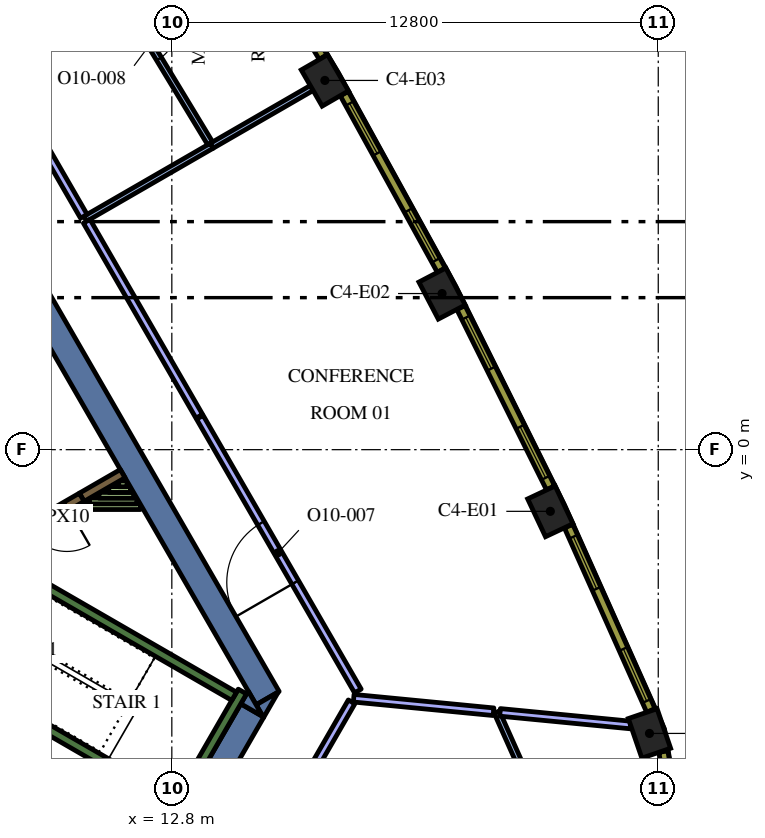
"""IFC4 building model, lengths in metres.
Left out: names, types, materials, properties, quantities, classifications, styles, units other than length and angle.
Written with IfcOpenShell. Run it as: python <this file> out.ifc"""

import sys

from ifc_helpers import new_model, si_unit, direction, frame, frame_2d, origin, origin_2d, place, context, subcontext, project, spatial, polyline, rectangle, outline, extrude, element, fill, save


model = new_model("IFC4")
c1 = context("Model", 3, precision=1e-05, world=origin(), true_north=direction((0.0, 1.0)))
c2 = subcontext(c1, "Body", "Model", "MODEL_VIEW")
j1 = project(units=[si_unit("LENGTHUNIT", "METRE"), si_unit("PLANEANGLEUNIT", "RADIAN")], contexts=[c1])
p1 = place(None, origin())
s1 = spatial("IfcSite", under=j1, at=p1, CompositionType="ELEMENT")
p2 = place(p1, origin())
s2 = spatial("IfcBuilding", under=s1, at=p2, CompositionType="ELEMENT")
p3 = place(p2, frame((0.0, 0.0, 252.0)))
s3 = spatial("IfcBuildingStorey", under=s2, at=p3, CompositionType="ELEMENT", Elevation=252.0)
for number, where, z_axis, x_axis in (
    (1, (25.369, -7.466, 0.0), (0.0, 0.0, 1.0), (-0.324, 0.946, 0.0)),
    (2, (22.76, -1.623, 0.0), (0.0, 0.0, 1.0), (-0.426, 0.905, 0.0)),
    (3, (19.912, 4.108, 0.0), (0.0, 0.0, 1.0), (-0.464, 0.886, 0.0)),
    (4, (16.827, 9.715, 0.0), (0.0, 0.0, 1.0), (-0.5, 0.866, 0.0)),
):
    element("IfcColumn", number, at=place(p3, frame(where, z_axis=z_axis, x_axis=x_axis)), inside=s3, PredefinedType="COLUMN", context=c2, shape_type="SweptSolid", body=[
        extrude(rectangle(XDim=1.1, YDim=0.8, at=origin_2d()), origin(), (0.0, 0.0, 1.0), 4.2),
    ])
p4 = place(p3, frame((9.085, 4.264, 0.0), z_axis=(0.0, 0.0, 1.0), x_axis=(0.499998082512, -0.866026510844, 0.0)))
e5 = element("IfcWall", 5, at=p4, inside=s3, PredefinedType="SOLIDWALL", context=c2, shape_type="SweptSolid", body=[
    extrude(rectangle(XDim=12.472, YDim=0.7, at=frame_2d((6.236, 0.0))), origin(), (0.0, 0.0, 1.0), 4.2),
])
p5 = place(p3, origin())
e6 = element("IfcWall", 6, at=p5, inside=s3, PredefinedType="SOLIDWALL", context=c2, shape_type="SweptSolid", body=[
    extrude(outline(polyline([(15.213, -7.05), (15.019, -6.714), (15.601, -6.378), (15.213, -7.05)])), origin(), (0.0, 0.0, 1.0), 4.2),
])
p6 = place(p3, frame((13.003, -10.179, 0.0), z_axis=(0.0, 0.0, 1.0), x_axis=(0.499972675833, 0.866041178825, 0.0)))
e7 = element("IfcWall", 7, at=p6, inside=s3, PredefinedType="SOLIDWALL", context=c2, shape_type="SweptSolid", body=[
    extrude(rectangle(XDim=3.829, YDim=0.7, at=frame_2d((1.915, 0.0))), origin(), (0.0, 0.0, 1.0), 4.2),
])
e8 = element("IfcWall", 8, at=p5, inside=s3, PredefinedType="SOLIDWALL", context=c2, shape_type="SweptSolid", body=[
    extrude(outline(polyline([(14.809, -6.35), (15.197, -7.022), (14.615, -6.686), (14.809, -6.35)])), origin(), (0.0, 0.0, 1.0), 4.2),
])
p7 = place(p3, frame((12.84, -9.511, 0.0), z_axis=(0.0, 0.0, 1.0), x_axis=(0.500048121057, 0.865997619297, 0.0)))
e9 = element("IfcWall", 9, at=p7, inside=s3, PredefinedType="SOLIDWALL", context=c2, shape_type="SweptSolid", body=[
    extrude(rectangle(XDim=3.634, YDim=0.25, at=frame_2d((1.817, 0.0))), origin(), (0.0, 0.0, 1.0), 4.2),
])
p8 = place(p3, frame((12.84, -9.261, 0.0), z_axis=(0.0, 0.0, 1.0), x_axis=(-0.866013990052, 0.500019768644, 0.0)))
e10 = element("IfcWall", 10, at=p8, inside=s3, PredefinedType="SOLIDWALL", context=c2, shape_type="SweptSolid", body=[
    extrude(rectangle(XDim=6.8, YDim=0.25, at=frame_2d((3.4, 0.0))), origin(), (0.0, 0.0, 1.0), 4.2),
])
p9 = place(p3, frame((8.334, -2.964, 0.0), z_axis=(0.0, 0.0, 1.0), x_axis=(0.866016039709, -0.500016218704, 0.0)))
e11 = element("IfcWall", 11, at=p9, inside=s3, PredefinedType="SOLIDWALL", context=c2, shape_type="SweptSolid", body=[
    extrude(rectangle(XDim=7.05, YDim=0.25, at=frame_2d((3.525, 0.0))), origin(), (0.0, 0.0, 1.0), 4.2),
])
p10 = place(p3, frame((11.507, -0.631, 0.0), z_axis=(0.0, 0.0, 1.0), x_axis=(-0.866025525965, -0.499999788377, 0.0)))
e12 = element("IfcWall", 12, at=p10, inside=s3, PredefinedType="SOLIDWALL", context=c2, shape_type="SweptSolid", body=[
    extrude(rectangle(XDim=1.245, YDim=0.25, at=frame_2d((0.622, 0.0))), origin(), (0.0, 0.0, 1.0), 4.2),
])
p11 = place(p3, frame((10.362, -1.5, 0.0), z_axis=(0.0, 0.0, 1.0), x_axis=(1.0, 0.0, 0.0)))
e13 = element("IfcWall", 13, at=p11, inside=s3, PredefinedType="PARTITIONING", context=c2, shape_type="SweptSolid", body=[
    extrude(rectangle(XDim=1.61, YDim=0.15, at=frame_2d((0.805, 0.0))), origin(), (0.0, 0.0, 1.0), 3.4),
])
p12 = place(p3, frame((10.622, -1.35, 0.0), z_axis=(0.0, 0.0, 1.0), x_axis=(1.0, 0.0, 0.0)))
e14 = element("IfcWall", 14, at=p12, inside=s3, PredefinedType="PARTITIONING", context=c2, shape_type="SweptSolid", body=[
    extrude(rectangle(XDim=1.263, YDim=0.15, at=frame_2d((0.632, 0.0))), origin(), (0.0, 0.0, 1.0), 3.4),
])
p13 = place(p3, frame((10.882, -1.2, 0.0), z_axis=(0.0, 0.0, 1.0), x_axis=(1.0, 0.0, 0.0)))
e15 = element("IfcWall", 15, at=p13, inside=s3, PredefinedType="PARTITIONING", context=c2, shape_type="SweptSolid", body=[
    extrude(rectangle(XDim=0.917, YDim=0.15, at=frame_2d((0.459, 0.0))), origin(), (0.0, 0.0, 1.0), 3.4),
])
p14 = place(p3, frame((11.712, -1.05, 0.0), z_axis=(0.0, 0.0, 1.0), x_axis=(-1.0, 0.0, 0.0)))
e16 = element("IfcWall", 16, at=p14, inside=s3, PredefinedType="PARTITIONING", context=c2, shape_type="SweptSolid", body=[
    extrude(rectangle(XDim=0.571, YDim=0.15, at=frame_2d((0.285, 0.0))), origin(), (0.0, 0.0, 1.0), 3.4),
])
p15 = place(p3, frame((11.401, -0.9, 0.0), z_axis=(0.0, 0.0, 1.0), x_axis=(1.0, 0.0, 0.0)))
e17 = element("IfcWall", 17, at=p15, inside=s3, PredefinedType="PARTITIONING", context=c2, shape_type="SweptSolid", body=[
    extrude(rectangle(XDim=0.224, YDim=0.15, at=frame_2d((0.112, 0.0))), origin(), (0.0, 0.0, 1.0), 3.4),
])
p16 = place(p3, frame((10.429, -1.253, 0.0), z_axis=(0.0, 0.0, 1.0), x_axis=(-0.866009402589, -0.500027713859, 0.0)))
e18 = element("IfcWall", 18, at=p16, inside=s3, PredefinedType="SOLIDWALL", context=c2, shape_type="SweptSolid", body=[
    extrude(rectangle(XDim=2.1, YDim=0.25, at=frame_2d((1.05, 0.0))), origin(), (0.0, 0.0, 1.0), 4.2),
])
p17 = place(p16, frame((0.45, 0.0, 0.0)))
e19 = element("IfcOpeningElement", 19, at=p17, cuts=e18, PredefinedType="OPENING", context=c2, shape_type="SweptSolid", body=[
    extrude(rectangle(XDim=1.2, YDim=2.1, at=frame_2d((0.6, 1.05))), frame((0.0, 0.135, 0.0), z_axis=(0.0, -1.0, 0.0), x_axis=(1.0, 0.0, 0.0)), (0.0, 0.0, 1.0), 0.27),
])
p18 = place(p3, frame((21.963, -8.276, 0.0), z_axis=(0.0, 0.0, 1.0), x_axis=(-0.407570957072, 0.913173540436, 0.0)))
e20 = element("IfcWall", 20, at=p18, inside=s3, PredefinedType="PARTITIONING", context=c2, shape_type="SweptSolid", body=[
    extrude(rectangle(XDim=1.502, YDim=0.15, at=frame_2d((0.751, 0.0))), origin(), (0.0, 0.0, 1.0), 3.4),
])
p19 = place(p3, frame((21.437, -6.913, 0.0), z_axis=(0.0, 0.0, 1.0), x_axis=(0.995357015301, -0.096251816042, 0.0)))
e21 = element("IfcWall", 21, at=p19, inside=s3, PredefinedType="PARTITIONING", context=c2, shape_type="SweptSolid", body=[
    extrude(rectangle(XDim=3.45, YDim=0.2, at=frame_2d((1.725, 0.0))), origin(), (0.0, 0.0, 1.0), 3.4),
])
p20 = place(p3, frame((17.586, -6.54, 0.0), z_axis=(0.0, 0.0, 1.0), x_axis=(0.995358181524, -0.096239755158, 0.0)))
e22 = element("IfcWall", 22, at=p20, inside=s3, PredefinedType="PARTITIONING", context=c2, shape_type="SweptSolid", body=[
    extrude(rectangle(XDim=3.696, YDim=0.2, at=frame_2d((1.848, 0.0))), origin(), (0.0, 0.0, 1.0), 3.4),
])
p21 = place(p3, frame((14.362, -12.124, 0.0), z_axis=(0.0, 0.0, 1.0), x_axis=(0.500017005442, 0.866015585465, 0.0)))
e23 = element("IfcWall", 23, at=p21, inside=s3, PredefinedType="PARTITIONING", context=c2, shape_type="SweptSolid", body=[
    extrude(rectangle(XDim=6.338, YDim=0.2, at=frame_2d((3.169, 0.0))), origin(), (0.0, 0.0, 1.0), 3.4),
])
p22 = place(p3, frame((13.844, 7.993, 0.0), z_axis=(0.0, 0.0, 1.0), x_axis=(0.866003976688, 0.500037110984, 0.0)))
e24 = element("IfcWall", 24, at=p22, inside=s3, PredefinedType="PARTITIONING", context=c2, shape_type="SweptSolid", body=[
    extrude(rectangle(XDim=3.045, YDim=0.15, at=frame_2d((1.522, 0.0))), origin(), (0.0, 0.0, 1.0), 3.4),
])
p23 = place(p3, frame((10.522, 6.075, 0.0), z_axis=(0.0, 0.0, 1.0), x_axis=(0.866002601515, 0.500039492609, 0.0)))
e25 = element("IfcWall", 25, at=p23, inside=s3, PredefinedType="PARTITIONING", context=c2, shape_type="SweptSolid", body=[
    extrude(rectangle(XDim=3.844, YDim=0.15, at=frame_2d((1.922, 0.0))), origin(), (0.0, 0.0, 1.0), 3.4),
])
p24 = place(p3, frame((13.522, 0.879, 0.0), z_axis=(0.0, 0.0, 1.0), x_axis=(-0.499994727438, 0.866028447878, 0.0)))
e26 = element("IfcWall", 26, at=p24, inside=s3, PredefinedType="PARTITIONING", context=c2, shape_type="SweptSolid", body=[
    extrude(rectangle(XDim=5.925, YDim=0.2, at=frame_2d((2.962, 0.0))), origin(), (0.0, 0.0, 1.0), 3.4),
])
p25 = place(p3, frame((17.696, -6.35, 0.0), z_axis=(0.0, 0.0, 1.0), x_axis=(-0.500009576767, 0.866019874565, 0.0)))
e27 = element("IfcWall", 27, at=p25, inside=s3, PredefinedType="PARTITIONING", context=c2, shape_type="SweptSolid", body=[
    extrude(rectangle(XDim=8.317, YDim=0.2, at=frame_2d((4.159, 0.0))), origin(), (0.0, 0.0, 1.0), 3.4),
])
p26 = place(p25, frame((3.3, 0.0, 0.0)))
e28 = element("IfcOpeningElement", 28, at=p26, cuts=e27, PredefinedType="OPENING", context=c2, shape_type="SweptSolid", body=[
    extrude(rectangle(XDim=1.8, YDim=2.1, at=frame_2d((0.9, 1.05))), frame((0.0, 0.11, 0.0), z_axis=(0.0, -1.0, 0.0), x_axis=(1.0, 0.0, 0.0)), (0.0, 0.0, 1.0), 0.22),
])
p27 = place(p3, frame((10.607, 13.347, 0.0), z_axis=(0.0, 0.0, 1.0), x_axis=(0.517871895574, -0.855458181196, 0.0)))
e29 = element("IfcWall", 29, at=p27, inside=s3, PredefinedType="PARTITIONING", context=c2, shape_type="SweptSolid", body=[
    extrude(rectangle(XDim=6.182, YDim=0.15, at=frame_2d((3.091, 0.0))), origin(), (0.0, 0.0, 1.0), 3.4),
])
p28 = place(p27, frame((2.682, 0.0, 0.0)))
e30 = element("IfcOpeningElement", 30, at=p28, cuts=e29, PredefinedType="OPENING", context=c2, shape_type="SweptSolid", body=[
    extrude(rectangle(XDim=0.9, YDim=2.1, at=frame_2d((0.45, 1.05))), frame((0.0, 0.085, 0.0), z_axis=(0.0, -1.0, 0.0), x_axis=(1.0, 0.0, 0.0)), (0.0, 0.0, 1.0), 0.17),
])
p29 = place(p3, frame((10.485, 6.14, 0.0), z_axis=(0.0, 0.0, 1.0), x_axis=(-0.499976885332, 0.866038748633, 0.0)))
e31 = element("IfcWall", 31, at=p29, inside=s3, PredefinedType="PARTITIONING", context=c2, shape_type="SweptSolid", body=[
    extrude(rectangle(XDim=5.925, YDim=0.2, at=frame_2d((2.962, 0.0))), origin(), (0.0, 0.0, 1.0), 3.4),
])
p30 = place(p3, frame((26.172, -10.517, 0.0), z_axis=(0.0, 0.0, 1.0), x_axis=(-0.167660055546, 0.985844869021, 0.0)))
e32 = element("IfcWall", 32, at=p30, inside=s3, PredefinedType="SOLIDWALL", context=c2, shape_type="SweptSolid", body=[
    extrude(rectangle(XDim=2.609, YDim=0.24, at=frame_2d((1.305, 0.0))), origin(), (0.0, 0.0, 1.0), 3.9),
])
p31 = place(p30, frame((0.805, 0.0, 0.9)))
e33 = element("IfcOpeningElement", 33, at=p31, cuts=e32, PredefinedType="OPENING", context=c2, shape_type="SweptSolid", body=[
    extrude(rectangle(XDim=1.0, YDim=2.55, at=frame_2d((0.5, 1.275))), frame((0.0, 0.13, 0.0), z_axis=(0.0, -1.0, 0.0), x_axis=(1.0, 0.0, 0.0)), (0.0, 0.0, 1.0), 0.26),
])
p32 = place(p3, frame((25.405, -6.861, 0.0), z_axis=(0.0, 0.0, 1.0), x_axis=(-0.407579651789, 0.913169659728, 0.0)))
e34 = element("IfcWall", 34, at=p32, inside=s3, PredefinedType="SOLIDWALL", context=c2, shape_type="SweptSolid", body=[
    extrude(rectangle(XDim=5.311, YDim=0.24, at=frame_2d((2.655, 0.0))), origin(), (0.0, 0.0, 1.0), 3.9),
])
p33 = place(p32, frame((0.271, 0.0, 0.9)))
e35 = element("IfcOpeningElement", 35, at=p33, cuts=e34, PredefinedType="OPENING", context=c2, shape_type="SweptSolid", body=[
    extrude(rectangle(XDim=1.5, YDim=2.55, at=frame_2d((0.75, 1.275))), frame((0.0, 0.13, 0.0), z_axis=(0.0, -1.0, 0.0), x_axis=(1.0, 0.0, 0.0)), (0.0, 0.0, 1.0), 0.26),
])
p34 = place(p32, frame((3.504, 0.0, 0.9)))
e36 = element("IfcOpeningElement", 36, at=p34, cuts=e34, PredefinedType="OPENING", context=c2, shape_type="SweptSolid", body=[
    extrude(rectangle(XDim=1.5, YDim=2.55, at=frame_2d((0.75, 1.275))), frame((0.0, 0.13, 0.0), z_axis=(0.0, -1.0, 0.0), x_axis=(1.0, 0.0, 0.0)), (0.0, 0.0, 1.0), 0.26),
])
p35 = place(p3, frame((22.766, -1.005, 0.0), z_axis=(0.0, 0.0, 1.0), x_axis=(-0.445129582031, 0.895466166419, 0.0)))
e37 = element("IfcWall", 37, at=p35, inside=s3, PredefinedType="SOLIDWALL", context=c2, shape_type="SweptSolid", body=[
    extrude(rectangle(XDim=5.298, YDim=0.24, at=frame_2d((2.649, 0.0))), origin(), (0.0, 0.0, 1.0), 3.9),
])
p36 = place(p35, frame((0.295, 0.0, 0.9)))
e38 = element("IfcOpeningElement", 38, at=p36, cuts=e37, PredefinedType="OPENING", context=c2, shape_type="SweptSolid", body=[
    extrude(rectangle(XDim=1.5, YDim=2.55, at=frame_2d((0.75, 1.275))), frame((0.0, 0.13, 0.0), z_axis=(0.0, -1.0, 0.0), x_axis=(1.0, 0.0, 0.0)), (0.0, 0.0, 1.0), 0.26),
])
p37 = place(p35, frame((3.504, 0.0, 0.9)))
e39 = element("IfcOpeningElement", 39, at=p37, cuts=e37, PredefinedType="OPENING", context=c2, shape_type="SweptSolid", body=[
    extrude(rectangle(XDim=1.5, YDim=2.55, at=frame_2d((0.75, 1.275))), frame((0.0, 0.13, 0.0), z_axis=(0.0, -1.0, 0.0), x_axis=(1.0, 0.0, 0.0)), (0.0, 0.0, 1.0), 0.26),
])
p38 = place(p3, frame((19.892, 4.725, 0.0), z_axis=(0.0, 0.0, 1.0), x_axis=(-0.481925825015, 0.876212017256, 0.0)))
e40 = element("IfcWall", 40, at=p38, inside=s3, PredefinedType="SOLIDWALL", context=c2, shape_type="SweptSolid", body=[
    extrude(rectangle(XDim=5.299, YDim=0.24, at=frame_2d((2.649, 0.0))), origin(), (0.0, 0.0, 1.0), 3.9),
])
p39 = place(p38, frame((0.295, 0.0, 0.9)))
e41 = element("IfcOpeningElement", 41, at=p39, cuts=e40, PredefinedType="OPENING", context=c2, shape_type="SweptSolid", body=[
    extrude(rectangle(XDim=1.5, YDim=2.55, at=frame_2d((0.75, 1.275))), frame((0.0, 0.13, 0.0), z_axis=(0.0, -1.0, 0.0), x_axis=(1.0, 0.0, 0.0)), (0.0, 0.0, 1.0), 0.26),
])
p40 = place(p38, frame((3.504, 0.0, 0.9)))
e42 = element("IfcOpeningElement", 42, at=p40, cuts=e40, PredefinedType="OPENING", context=c2, shape_type="SweptSolid", body=[
    extrude(rectangle(XDim=1.5, YDim=2.55, at=frame_2d((0.75, 1.275))), frame((0.0, 0.13, 0.0), z_axis=(0.0, -1.0, 0.0), x_axis=(1.0, 0.0, 0.0)), (0.0, 0.0, 1.0), 0.26),
])
p41 = place(p3, frame((16.782, 10.331, 0.0), z_axis=(0.0, 0.0, 1.0), x_axis=(-0.517846166225, 0.855473756538, 0.0)))
e43 = element("IfcWall", 43, at=p41, inside=s3, PredefinedType="SOLIDWALL", context=c2, shape_type="SweptSolid", body=[
    extrude(rectangle(XDim=5.298, YDim=0.24, at=frame_2d((2.649, 0.0))), origin(), (0.0, 0.0, 1.0), 3.9),
])
p42 = place(p41, frame((0.294, 0.0, 0.9)))
e44 = element("IfcOpeningElement", 44, at=p42, cuts=e43, PredefinedType="OPENING", context=c2, shape_type="SweptSolid", body=[
    extrude(rectangle(XDim=1.5, YDim=2.55, at=frame_2d((0.75, 1.275))), frame((0.0, 0.13, 0.0), z_axis=(0.0, -1.0, 0.0), x_axis=(1.0, 0.0, 0.0)), (0.0, 0.0, 1.0), 0.26),
])
p43 = place(p41, frame((3.504, 0.0, 0.9)))
e45 = element("IfcOpeningElement", 45, at=p43, cuts=e43, PredefinedType="OPENING", context=c2, shape_type="SweptSolid", body=[
    extrude(rectangle(XDim=1.5, YDim=2.55, at=frame_2d((0.75, 1.275))), frame((0.0, 0.13, 0.0), z_axis=(0.0, -1.0, 0.0), x_axis=(1.0, 0.0, 0.0)), (0.0, 0.0, 1.0), 0.26),
])
p44 = place(p17, origin())
e46 = element("IfcDoor", 46, at=p44, inside=s3, OperationType="SINGLE_SWING_LEFT", PredefinedType="DOOR", context=c2, shape_type="SweptSolid", body=[
    extrude(rectangle(XDim=1.2, YDim=2.1, at=frame_2d((0.6, 1.05))), frame((0.0, 0.025, 0.0), z_axis=(0.0, -1.0, 0.0), x_axis=(1.0, 0.0, 0.0)), (0.0, 0.0, 1.0), 0.05),
])
fill(e19, e46)
p45 = place(p26, origin())
e47 = element("IfcDoor", 47, at=p45, inside=s3, OperationType="DOUBLE_DOOR_SINGLE_SWING", PredefinedType="DOOR", context=c2, shape_type="SweptSolid", body=[
    extrude(rectangle(XDim=1.8, YDim=2.1, at=frame_2d((0.9, 1.05))), frame((0.0, 0.025, 0.0), z_axis=(0.0, -1.0, 0.0), x_axis=(1.0, 0.0, 0.0)), (0.0, 0.0, 1.0), 0.05),
])
fill(e28, e47)
p46 = place(p28, origin())
e48 = element("IfcDoor", 48, at=p46, inside=s3, OperationType="SINGLE_SWING_RIGHT", PredefinedType="DOOR", context=c2, shape_type="SweptSolid", body=[
    extrude(rectangle(XDim=0.9, YDim=2.1, at=frame_2d((0.45, 1.05))), frame((0.0, 0.025, 0.0), z_axis=(0.0, -1.0, 0.0), x_axis=(1.0, 0.0, 0.0)), (0.0, 0.0, 1.0), 0.05),
])
fill(e30, e48)
p47 = place(p33, origin())
e49 = element("IfcWindow", 49, at=p47, inside=s3, PartitioningType="SINGLE_PANEL", PredefinedType="WINDOW", context=c2, shape_type="SweptSolid", body=[
    extrude(rectangle(XDim=1.5, YDim=2.55, at=frame_2d((0.75, 1.275))), frame((0.0, 0.04, 0.0), z_axis=(0.0, -1.0, 0.0), x_axis=(1.0, 0.0, 0.0)), (0.0, 0.0, 1.0), 0.06),
])
fill(e35, e49)
p48 = place(p34, origin())
e50 = element("IfcWindow", 50, at=p48, inside=s3, PartitioningType="SINGLE_PANEL", PredefinedType="WINDOW", context=c2, shape_type="SweptSolid", body=[
    extrude(rectangle(XDim=1.5, YDim=2.55, at=frame_2d((0.75, 1.275))), frame((0.0, 0.04, 0.0), z_axis=(0.0, -1.0, 0.0), x_axis=(1.0, 0.0, 0.0)), (0.0, 0.0, 1.0), 0.06),
])
fill(e36, e50)
p49 = place(p36, origin())
e51 = element("IfcWindow", 51, at=p49, inside=s3, PartitioningType="SINGLE_PANEL", PredefinedType="WINDOW", context=c2, shape_type="SweptSolid", body=[
    extrude(rectangle(XDim=1.5, YDim=2.55, at=frame_2d((0.75, 1.275))), frame((0.0, 0.04, 0.0), z_axis=(0.0, -1.0, 0.0), x_axis=(1.0, 0.0, 0.0)), (0.0, 0.0, 1.0), 0.06),
])
fill(e38, e51)
p50 = place(p37, origin())
e52 = element("IfcWindow", 52, at=p50, inside=s3, PartitioningType="SINGLE_PANEL", PredefinedType="WINDOW", context=c2, shape_type="SweptSolid", body=[
    extrude(rectangle(XDim=1.5, YDim=2.55, at=frame_2d((0.75, 1.275))), frame((0.0, 0.04, 0.0), z_axis=(0.0, -1.0, 0.0), x_axis=(1.0, 0.0, 0.0)), (0.0, 0.0, 1.0), 0.06),
])
fill(e39, e52)
p51 = place(p39, origin())
e53 = element("IfcWindow", 53, at=p51, inside=s3, PartitioningType="SINGLE_PANEL", PredefinedType="WINDOW", context=c2, shape_type="SweptSolid", body=[
    extrude(rectangle(XDim=1.5, YDim=2.55, at=frame_2d((0.75, 1.275))), frame((0.0, 0.04, 0.0), z_axis=(0.0, -1.0, 0.0), x_axis=(1.0, 0.0, 0.0)), (0.0, 0.0, 1.0), 0.06),
])
fill(e41, e53)
p52 = place(p40, origin())
e54 = element("IfcWindow", 54, at=p52, inside=s3, PartitioningType="SINGLE_PANEL", PredefinedType="WINDOW", context=c2, shape_type="SweptSolid", body=[
    extrude(rectangle(XDim=1.5, YDim=2.55, at=frame_2d((0.75, 1.275))), frame((0.0, 0.04, 0.0), z_axis=(0.0, -1.0, 0.0), x_axis=(1.0, 0.0, 0.0)), (0.0, 0.0, 1.0), 0.06),
])
fill(e42, e54)
save(model, sys.argv[1])
